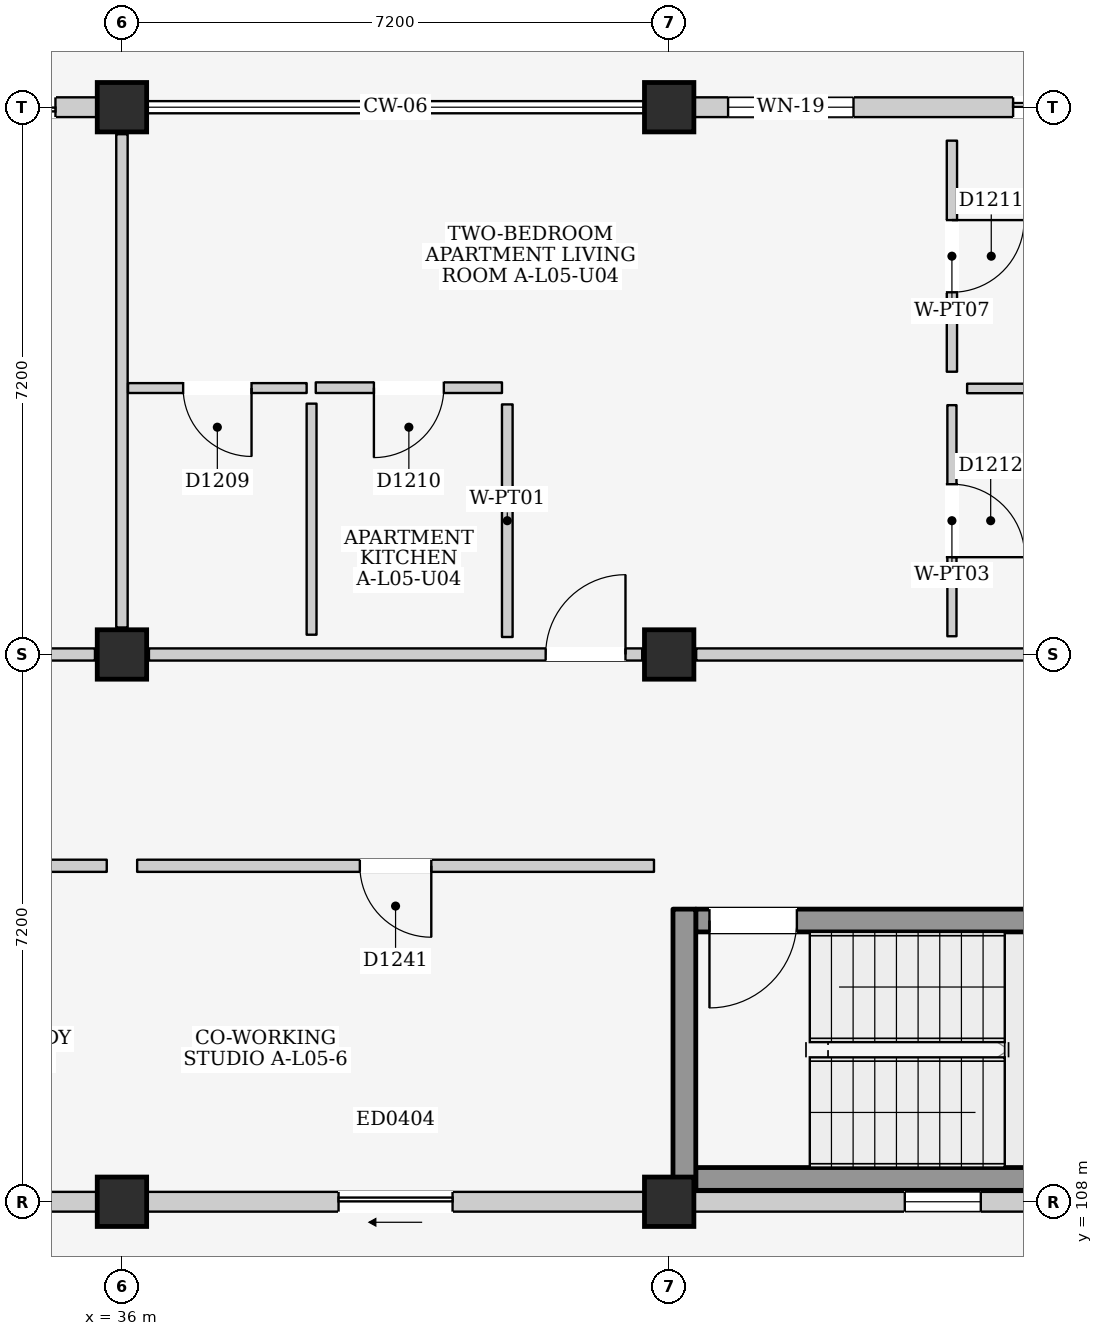
"""IFC4 building model, lengths in metres.
Left out: names, types, materials, properties, quantities, classifications, styles, units other than length and angle.
Written with IfcOpenShell. Run it as: python <this file> out.ifc"""

import sys

from ifc_helpers import new_model, si_unit, direction, frame, frame_2d, origin, origin_2d, place, context, subcontext, project, spatial, rectangle, extrude, element, fill, save


model = new_model("IFC4")
c1 = context("Model", 3, precision=1e-05, world=origin(), true_north=direction((0.0, 1.0)))
c2 = subcontext(c1, "Body", "Model", "MODEL_VIEW")
j1 = project(units=[si_unit("LENGTHUNIT", "METRE"), si_unit("PLANEANGLEUNIT", "RADIAN")], contexts=[c1])
p1 = place(None, origin())
s1 = spatial("IfcSite", under=j1, at=p1, CompositionType="ELEMENT")
p2 = place(p1, origin())
s2 = spatial("IfcBuilding", under=s1, at=p2, CompositionType="ELEMENT")
p3 = place(p2, frame((0.0, 0.0, 18.6)))
s3 = spatial("IfcBuildingStorey", under=s2, at=p3, CompositionType="ELEMENT", Elevation=18.6)
for number, where, z_axis, x_axis in (
    (1, (36.0, 108.0, 0.0), (0.0, 0.0, 1.0), (1.0, 0.0, 0.0)),
    (2, (36.0, 115.2, 0.0), (0.0, 0.0, 1.0), (1.0, 0.0, 0.0)),
    (3, (36.0, 122.4, 0.0), (0.0, 0.0, 1.0), (1.0, 0.0, 0.0)),
    (4, (43.2, 108.0, 0.0), (0.0, 0.0, 1.0), (1.0, 0.0, 0.0)),
    (5, (43.2, 115.2, 0.0), (0.0, 0.0, 1.0), (1.0, 0.0, 0.0)),
    (6, (43.2, 122.4, 0.0), (0.0, 0.0, 1.0), (1.0, 0.0, 0.0)),
):
    element("IfcColumn", number, at=place(p3, frame(where, z_axis=z_axis, x_axis=x_axis)), inside=s3, PredefinedType="COLUMN", context=c2, shape_type="SweptSolid", body=[
        extrude(rectangle(XDim=0.65, YDim=0.65, at=origin_2d()), origin(), (0.0, 0.0, 1.0), 3.3),
    ])
p4 = place(p3, frame((29.125, 122.4, 0.0), z_axis=(0.0, 0.0, 1.0), x_axis=(1.0, 0.0, 0.0)))
e7 = element("IfcWall", 7, at=p4, inside=s3, PredefinedType="ELEMENTEDWALL", context=c2, shape_type="SweptSolid", body=[
    extrude(rectangle(XDim=6.55, YDim=0.26, at=frame_2d((3.275, 0.0))), origin(), (0.0, 0.0, 1.0), 2.595),
])
p5 = place(p4, frame((4.0, 0.0, 0.0)))
e8 = element("IfcOpeningElement", 8, at=p5, cuts=e7, PredefinedType="OPENING", context=c2, shape_type="SweptSolid", body=[
    extrude(rectangle(XDim=2.0, YDim=2.12, at=frame_2d((1.0, 1.06))), frame((0.0, 0.145, 0.0), z_axis=(0.0, -1.0, 0.0), x_axis=(1.0, 0.0, 0.0)), (0.0, 0.0, 1.0), 0.29),
])
p6 = place(p4, frame((0.45, 0.0, 0.9)))
e9 = element("IfcOpeningElement", 9, at=p6, cuts=e7, PredefinedType="OPENING", context=c2, shape_type="SweptSolid", body=[
    extrude(rectangle(XDim=1.25, YDim=1.3, at=frame_2d((0.625, 0.65))), frame((0.0, 0.145, 0.0), z_axis=(0.0, -1.0, 0.0), x_axis=(1.0, 0.0, 0.0)), (0.0, 0.0, 1.0), 0.29),
])
p7 = place(p3, frame((29.125, 108.0, 0.0), z_axis=(0.0, 0.0, 1.0), x_axis=(1.0, 0.0, 0.0)))
e10 = element("IfcWall", 10, at=p7, inside=s3, PredefinedType="ELEMENTEDWALL", context=c2, shape_type="SweptSolid", body=[
    extrude(rectangle(XDim=6.55, YDim=0.26, at=frame_2d((3.275, 0.0))), origin(), (0.0, 0.0, 1.0), 2.395),
])
p8 = place(p7, frame((2.525, 0.0, 0.0)))
e11 = element("IfcOpeningElement", 11, at=p8, cuts=e10, PredefinedType="OPENING", context=c2, shape_type="SweptSolid", body=[
    extrude(rectangle(XDim=1.5, YDim=2.12, at=frame_2d((0.75, 1.06))), frame((0.0, 0.145, 0.0), z_axis=(0.0, -1.0, 0.0), x_axis=(1.0, 0.0, 0.0)), (0.0, 0.0, 1.0), 0.29),
])
p9 = place(p3, frame((36.325, 108.0, 0.0), z_axis=(0.0, 0.0, 1.0), x_axis=(1.0, 0.0, 0.0)))
e12 = element("IfcWall", 12, at=p9, inside=s3, PredefinedType="ELEMENTEDWALL", context=c2, shape_type="SweptSolid", body=[
    extrude(rectangle(XDim=6.55, YDim=0.26, at=frame_2d((3.275, 0.0))), origin(), (0.0, 0.0, 1.0), 2.395),
])
p10 = place(p9, frame((2.525, 0.0, 0.0)))
e13 = element("IfcOpeningElement", 13, at=p10, cuts=e12, PredefinedType="OPENING", context=c2, shape_type="SweptSolid", body=[
    extrude(rectangle(XDim=1.5, YDim=2.12, at=frame_2d((0.75, 1.06))), frame((0.0, 0.145, 0.0), z_axis=(0.0, -1.0, 0.0), x_axis=(1.0, 0.0, 0.0)), (0.0, 0.0, 1.0), 0.29),
])
p11 = place(p3, frame((43.525, 122.4, 0.0), z_axis=(0.0, 0.0, 1.0), x_axis=(1.0, 0.0, 0.0)))
e14 = element("IfcWall", 14, at=p11, inside=s3, PredefinedType="ELEMENTEDWALL", context=c2, shape_type="SweptSolid", body=[
    extrude(rectangle(XDim=6.55, YDim=0.26, at=frame_2d((3.275, 0.0))), origin(), (0.0, 0.0, 1.0), 2.595),
])
p12 = place(p11, frame((4.2, 0.0, 0.0)))
e15 = element("IfcOpeningElement", 15, at=p12, cuts=e14, PredefinedType="OPENING", context=c2, shape_type="SweptSolid", body=[
    extrude(rectangle(XDim=1.8, YDim=2.12, at=frame_2d((0.9, 1.06))), frame((0.0, 0.145, 0.0), z_axis=(0.0, -1.0, 0.0), x_axis=(1.0, 0.0, 0.0)), (0.0, 0.0, 1.0), 0.29),
])
p13 = place(p11, frame((0.45, 0.0, 0.9)))
e16 = element("IfcOpeningElement", 16, at=p13, cuts=e14, PredefinedType="OPENING", context=c2, shape_type="SweptSolid", body=[
    extrude(rectangle(XDim=1.65, YDim=1.35, at=frame_2d((0.825, 0.675))), frame((0.0, 0.145, 0.0), z_axis=(0.0, -1.0, 0.0), x_axis=(1.0, 0.0, 0.0)), (0.0, 0.0, 1.0), 0.29),
])
p14 = place(p3, frame((43.525, 108.0, 0.0), z_axis=(0.0, 0.0, 1.0), x_axis=(1.0, 0.0, 0.0)))
e17 = element("IfcWall", 17, at=p14, inside=s3, PredefinedType="ELEMENTEDWALL", context=c2, shape_type="SweptSolid", body=[
    extrude(rectangle(XDim=6.55, YDim=0.26, at=frame_2d((3.275, 0.0))), origin(), (0.0, 0.0, 1.0), 2.395),
])
p15 = place(p14, frame((2.775, 0.0, 1.2)))
e18 = element("IfcOpeningElement", 18, at=p15, cuts=e17, PredefinedType="OPENING", context=c2, shape_type="SweptSolid", body=[
    extrude(rectangle(XDim=1.0, YDim=0.9, at=frame_2d((0.5, 0.45))), frame((0.0, 0.145, 0.0), z_axis=(0.0, -1.0, 0.0), x_axis=(1.0, 0.0, 0.0)), (0.0, 0.0, 1.0), 0.29),
])
p16 = place(p3, frame((43.55, 108.3, 0.0), z_axis=(0.0, 0.0, 1.0), x_axis=(1.0, 0.0, 0.0)))
e19 = element("IfcWall", 19, at=p16, inside=s3, PredefinedType="SHEAR", context=c2, shape_type="SweptSolid", body=[
    extrude(rectangle(XDim=6.5, YDim=0.3, at=frame_2d((3.25, 0.0))), origin(), (0.0, 0.0, 1.0), 3.06),
])
p17 = place(p3, frame((43.55, 111.7, 0.0), z_axis=(0.0, 0.0, 1.0), x_axis=(1.0, 0.0, 0.0)))
e20 = element("IfcWall", 20, at=p17, inside=s3, PredefinedType="SHEAR", context=c2, shape_type="SweptSolid", body=[
    extrude(rectangle(XDim=6.5, YDim=0.3, at=frame_2d((3.25, 0.0))), origin(), (0.0, 0.0, 1.0), 3.06),
])
p18 = place(p17, frame((0.18, 0.0, 0.0)))
e21 = element("IfcOpeningElement", 21, at=p18, cuts=e20, PredefinedType="OPENING", context=c2, shape_type="SweptSolid", body=[
    extrude(rectangle(XDim=1.15, YDim=2.2, at=frame_2d((0.575, 1.1))), frame((0.0, 0.165, 0.0), z_axis=(0.0, -1.0, 0.0), x_axis=(1.0, 0.0, 0.0)), (0.0, 0.0, 1.0), 0.33),
])
p19 = place(p3, frame((43.4, 108.15, 0.0), z_axis=(0.0, 0.0, 1.0), x_axis=(0.0, 1.0, 0.0)))
e22 = element("IfcWall", 22, at=p19, inside=s3, PredefinedType="SHEAR", context=c2, shape_type="SweptSolid", body=[
    extrude(rectangle(XDim=3.7, YDim=0.3, at=frame_2d((1.85, 0.0))), origin(), (0.0, 0.0, 1.0), 3.06),
])
p20 = place(p3, frame((29.155, 115.2, 0.0), z_axis=(0.0, 0.0, 1.0), x_axis=(1.0, 0.0, 0.0)))
e23 = element("IfcWall", 23, at=p20, inside=s3, PredefinedType="PARTITIONING", context=c2, shape_type="SweptSolid", body=[
    extrude(rectangle(XDim=6.49, YDim=0.16, at=frame_2d((3.245, 0.0))), origin(), (0.0, 0.0, 1.0), 2.395),
])
p21 = place(p20, frame((2.72, 0.0, 0.0)))
e24 = element("IfcOpeningElement", 24, at=p21, cuts=e23, PredefinedType="OPENING", context=c2, shape_type="SweptSolid", body=[
    extrude(rectangle(XDim=1.05, YDim=2.15, at=frame_2d((0.525, 1.075))), frame((0.0, 0.095, 0.0), z_axis=(0.0, -1.0, 0.0), x_axis=(1.0, 0.0, 0.0)), (0.0, 0.0, 1.0), 0.19),
])
p22 = place(p3, frame((36.0, 115.555, 0.0), z_axis=(0.0, 0.0, 1.0), x_axis=(0.0, 1.0, 0.0)))
e25 = element("IfcWall", 25, at=p22, inside=s3, PredefinedType="PARTITIONING", context=c2, shape_type="SweptSolid", body=[
    extrude(rectangle(XDim=6.49, YDim=0.15, at=frame_2d((3.245, 0.0))), origin(), (0.0, 0.0, 1.0), 2.545),
])
p23 = place(p3, frame((36.355, 115.2, 0.0), z_axis=(0.0, 0.0, 1.0), x_axis=(1.0, 0.0, 0.0)))
e26 = element("IfcWall", 26, at=p23, inside=s3, PredefinedType="PARTITIONING", context=c2, shape_type="SweptSolid", body=[
    extrude(rectangle(XDim=6.49, YDim=0.16, at=frame_2d((3.245, 0.0))), origin(), (0.0, 0.0, 1.0), 2.395),
])
p24 = place(p23, frame((5.22, 0.0, 0.0)))
e27 = element("IfcOpeningElement", 27, at=p24, cuts=e26, PredefinedType="OPENING", context=c2, shape_type="SweptSolid", body=[
    extrude(rectangle(XDim=1.05, YDim=2.15, at=frame_2d((0.525, 1.075))), frame((0.0, 0.095, 0.0), z_axis=(0.0, -1.0, 0.0), x_axis=(1.0, 0.0, 0.0)), (0.0, 0.0, 1.0), 0.19),
])
p25 = place(p3, frame((43.555, 115.2, 0.0), z_axis=(0.0, 0.0, 1.0), x_axis=(1.0, 0.0, 0.0)))
e28 = element("IfcWall", 28, at=p25, inside=s3, PredefinedType="PARTITIONING", context=c2, shape_type="SweptSolid", body=[
    extrude(rectangle(XDim=6.49, YDim=0.16, at=frame_2d((3.245, 0.0))), origin(), (0.0, 0.0, 1.0), 2.395),
])
p26 = place(p3, frame((36.08, 118.705, 0.0), z_axis=(0.0, 0.0, 1.0), x_axis=(1.0, 0.0, 0.0)))
e29 = element("IfcWall", 29, at=p26, inside=s3, PredefinedType="PARTITIONING", context=c2, shape_type="SweptSolid", body=[
    extrude(rectangle(XDim=2.35, YDim=0.13, at=frame_2d((1.175, 0.0))), origin(), (0.0, 0.0, 1.0), 3.06),
])
p27 = place(p26, frame((0.725, 0.0, 0.0)))
e30 = element("IfcOpeningElement", 30, at=p27, cuts=e29, PredefinedType="OPENING", context=c2, shape_type="SweptSolid", body=[
    extrude(rectangle(XDim=0.9, YDim=2.1, at=frame_2d((0.45, 1.05))), frame((0.0, 0.08, 0.0), z_axis=(0.0, -1.0, 0.0), x_axis=(1.0, 0.0, 0.0)), (0.0, 0.0, 1.0), 0.16),
])
p28 = place(p3, frame((38.495, 115.46, 0.0), z_axis=(0.0, 0.0, 1.0), x_axis=(0.0, 1.0, 0.0)))
e31 = element("IfcWall", 31, at=p28, inside=s3, PredefinedType="PARTITIONING", context=c2, shape_type="SweptSolid", body=[
    extrude(rectangle(XDim=3.04, YDim=0.13, at=frame_2d((1.52, 0.0))), origin(), (0.0, 0.0, 1.0), 3.06),
])
p29 = place(p3, frame((38.55, 118.71, 0.0), z_axis=(0.0, 0.0, 1.0), x_axis=(1.0, 0.0, 0.0)))
e32 = element("IfcWall", 32, at=p29, inside=s3, PredefinedType="PARTITIONING", context=c2, shape_type="SweptSolid", body=[
    extrude(rectangle(XDim=2.45, YDim=0.14, at=frame_2d((1.225, 0.0))), origin(), (0.0, 0.0, 1.0), 3.06),
])
p30 = place(p29, frame((0.765, 0.0, 0.0)))
e33 = element("IfcOpeningElement", 33, at=p30, cuts=e32, PredefinedType="OPENING", context=c2, shape_type="SweptSolid", body=[
    extrude(rectangle(XDim=0.92, YDim=2.1, at=frame_2d((0.46, 1.05))), frame((0.0, 0.085, 0.0), z_axis=(0.0, -1.0, 0.0), x_axis=(1.0, 0.0, 0.0)), (0.0, 0.0, 1.0), 0.17),
])
p31 = place(p3, frame((41.07, 115.43, 0.0), z_axis=(0.0, 0.0, 1.0), x_axis=(0.0, 1.0, 0.0)))
e34 = element("IfcWall", 34, at=p31, inside=s3, PredefinedType="PARTITIONING", context=c2, shape_type="SweptSolid", body=[
    extrude(rectangle(XDim=3.06, YDim=0.14, at=frame_2d((1.53, 0.0))), origin(), (0.0, 0.0, 1.0), 3.06),
])
p32 = place(p3, frame((46.92, 118.92, 0.0), z_axis=(0.0, 0.0, 1.0), x_axis=(0.0, 1.0, 0.0)))
e35 = element("IfcWall", 35, at=p32, inside=s3, PredefinedType="PARTITIONING", context=c2, shape_type="SweptSolid", body=[
    extrude(rectangle(XDim=3.04, YDim=0.135, at=frame_2d((1.52, 0.0))), origin(), (0.0, 0.0, 1.0), 3.06),
])
p33 = place(p32, frame((1.045, 0.0, 0.0)))
e36 = element("IfcOpeningElement", 36, at=p33, cuts=e35, PredefinedType="OPENING", context=c2, shape_type="SweptSolid", body=[
    extrude(rectangle(XDim=0.95, YDim=2.15, at=frame_2d((0.475, 1.075))), frame((0.0, 0.083, 0.0), z_axis=(0.0, -1.0, 0.0), x_axis=(1.0, 0.0, 0.0)), (0.0, 0.0, 1.0), 0.165),
])
p34 = place(p3, frame((47.12, 118.7, 0.0), z_axis=(0.0, 0.0, 1.0), x_axis=(1.0, 0.0, 0.0)))
e37 = element("IfcWall", 37, at=p34, inside=s3, PredefinedType="PARTITIONING", context=c2, shape_type="SweptSolid", body=[
    extrude(rectangle(XDim=3.06, YDim=0.125, at=frame_2d((1.53, 0.0))), origin(), (0.0, 0.0, 1.0), 3.06),
])
p35 = place(p3, frame((46.92, 115.44, 0.0), z_axis=(0.0, 0.0, 1.0), x_axis=(0.0, 1.0, 0.0)))
e38 = element("IfcWall", 38, at=p35, inside=s3, PredefinedType="PARTITIONING", context=c2, shape_type="SweptSolid", body=[
    extrude(rectangle(XDim=3.04, YDim=0.12, at=frame_2d((1.52, 0.0))), origin(), (0.0, 0.0, 1.0), 3.06),
])
p36 = place(p35, frame((1.04, 0.0, 0.0)))
e39 = element("IfcOpeningElement", 39, at=p36, cuts=e38, PredefinedType="OPENING", context=c2, shape_type="SweptSolid", body=[
    extrude(rectangle(XDim=0.96, YDim=2.15, at=frame_2d((0.48, 1.075))), frame((0.0, 0.075, 0.0), z_axis=(0.0, -1.0, 0.0), x_axis=(1.0, 0.0, 0.0)), (0.0, 0.0, 1.0), 0.15),
])
p37 = place(p3, frame((29.0, 112.42, 0.0), z_axis=(0.0, 0.0, 1.0), x_axis=(1.0, 0.0, 0.0)))
e40 = element("IfcWall", 40, at=p37, inside=s3, PredefinedType="PARTITIONING", context=c2, shape_type="SweptSolid", body=[
    extrude(rectangle(XDim=6.8, YDim=0.16, at=frame_2d((3.4, 0.0))), origin(), (0.0, 0.0, 1.0), 3.06),
])
p38 = place(p37, frame((2.93, 0.0, 0.0)))
e41 = element("IfcOpeningElement", 41, at=p38, cuts=e40, PredefinedType="OPENING", context=c2, shape_type="SweptSolid", body=[
    extrude(rectangle(XDim=0.94, YDim=2.12, at=frame_2d((0.47, 1.06))), frame((0.0, 0.095, 0.0), z_axis=(0.0, -1.0, 0.0), x_axis=(1.0, 0.0, 0.0)), (0.0, 0.0, 1.0), 0.19),
])
p39 = place(p3, frame((36.2, 112.42, 0.0), z_axis=(0.0, 0.0, 1.0), x_axis=(1.0, 0.0, 0.0)))
e42 = element("IfcWall", 42, at=p39, inside=s3, PredefinedType="PARTITIONING", context=c2, shape_type="SweptSolid", body=[
    extrude(rectangle(XDim=6.8, YDim=0.16, at=frame_2d((3.4, 0.0))), origin(), (0.0, 0.0, 1.0), 3.06),
])
p40 = place(p39, frame((2.93, 0.0, 0.0)))
e43 = element("IfcOpeningElement", 43, at=p40, cuts=e42, PredefinedType="OPENING", context=c2, shape_type="SweptSolid", body=[
    extrude(rectangle(XDim=0.94, YDim=2.12, at=frame_2d((0.47, 1.06))), frame((0.0, 0.095, 0.0), z_axis=(0.0, -1.0, 0.0), x_axis=(1.0, 0.0, 0.0)), (0.0, 0.0, 1.0), 0.19),
])
p41 = place(p5, frame((2.0, 0.0, 0.0), z_axis=(0.0, 0.0, 1.0), x_axis=(-1.0, 0.0, 0.0)))
e44 = element("IfcDoor", 44, at=p41, inside=s3, OperationType="DOUBLE_DOOR_SLIDING", PredefinedType="DOOR", context=c2, shape_type="SweptSolid", body=[
    extrude(rectangle(XDim=2.0, YDim=2.12, at=frame_2d((1.0, 1.06))), frame((0.0, 0.025, 0.0), z_axis=(0.0, -1.0, 0.0), x_axis=(1.0, 0.0, 0.0)), (0.0, 0.0, 1.0), 0.05),
])
fill(e8, e44)
p42 = place(p10, frame((1.5, 0.0, 0.0), z_axis=(0.0, 0.0, 1.0), x_axis=(-1.0, 0.0, 0.0)))
e45 = element("IfcDoor", 45, at=p42, inside=s3, OperationType="SLIDING_TO_LEFT", PredefinedType="DOOR", context=c2, shape_type="SweptSolid", body=[
    extrude(rectangle(XDim=1.5, YDim=2.12, at=frame_2d((0.75, 1.06))), frame((0.0, 0.025, 0.0), z_axis=(0.0, -1.0, 0.0), x_axis=(1.0, 0.0, 0.0)), (0.0, 0.0, 1.0), 0.05),
])
fill(e13, e45)
p43 = place(p12, frame((1.8, 0.0, 0.0), z_axis=(0.0, 0.0, 1.0), x_axis=(-1.0, 0.0, 0.0)))
e46 = element("IfcDoor", 46, at=p43, inside=s3, OperationType="SLIDING_TO_LEFT", PredefinedType="DOOR", context=c2, shape_type="SweptSolid", body=[
    extrude(rectangle(XDim=1.8, YDim=2.12, at=frame_2d((0.9, 1.06))), frame((0.0, 0.025, 0.0), z_axis=(0.0, -1.0, 0.0), x_axis=(1.0, 0.0, 0.0)), (0.0, 0.0, 1.0), 0.05),
])
fill(e15, e46)
p44 = place(p13, origin())
e47 = element("IfcWindow", 47, at=p44, inside=s3, PartitioningType="DOUBLE_PANEL_VERTICAL", PredefinedType="WINDOW", context=c2, shape_type="SweptSolid", body=[
    extrude(rectangle(XDim=1.65, YDim=1.35, at=frame_2d((0.825, 0.675))), frame((0.0, 0.03, 0.0), z_axis=(0.0, -1.0, 0.0), x_axis=(1.0, 0.0, 0.0)), (0.0, 0.0, 1.0), 0.06),
])
fill(e16, e47)
p45 = place(p15, origin())
e48 = element("IfcWindow", 48, at=p45, inside=s3, PartitioningType="SINGLE_PANEL", PredefinedType="WINDOW", context=c2, shape_type="SweptSolid", body=[
    extrude(rectangle(XDim=1.0, YDim=0.9, at=frame_2d((0.5, 0.45))), frame((0.0, 0.03, 0.0), z_axis=(0.0, -1.0, 0.0), x_axis=(1.0, 0.0, 0.0)), (0.0, 0.0, 1.0), 0.06),
])
fill(e18, e48)
p46 = place(p18, frame((1.15, 0.0, 0.0), z_axis=(0.0, 0.0, 1.0), x_axis=(-1.0, 0.0, 0.0)))
e49 = element("IfcDoor", 49, at=p46, inside=s3, OperationType="SINGLE_SWING_RIGHT", PredefinedType="DOOR", context=c2, shape_type="SweptSolid", body=[
    extrude(rectangle(XDim=1.15, YDim=2.2, at=frame_2d((0.575, 1.1))), frame((0.0, 0.025, 0.0), z_axis=(0.0, -1.0, 0.0), x_axis=(1.0, 0.0, 0.0)), (0.0, 0.0, 1.0), 0.05),
])
fill(e21, e49)
p47 = place(p24, origin())
e50 = element("IfcDoor", 50, at=p47, inside=s3, OperationType="SINGLE_SWING_RIGHT", PredefinedType="DOOR", context=c2, shape_type="SweptSolid", body=[
    extrude(rectangle(XDim=1.05, YDim=2.15, at=frame_2d((0.525, 1.075))), frame((0.0, 0.025, 0.0), z_axis=(0.0, -1.0, 0.0), x_axis=(1.0, 0.0, 0.0)), (0.0, 0.0, 1.0), 0.05),
])
fill(e27, e50)
p48 = place(p27, frame((0.9, 0.0, 0.0), z_axis=(0.0, 0.0, 1.0), x_axis=(-1.0, 0.0, 0.0)))
e51 = element("IfcDoor", 51, at=p48, inside=s3, OperationType="SINGLE_SWING_LEFT", PredefinedType="DOOR", context=c2, shape_type="SweptSolid", body=[
    extrude(rectangle(XDim=0.9, YDim=2.1, at=frame_2d((0.45, 1.05))), frame((0.0, 0.025, 0.0), z_axis=(0.0, -1.0, 0.0), x_axis=(1.0, 0.0, 0.0)), (0.0, 0.0, 1.0), 0.05),
])
fill(e30, e51)
p49 = place(p30, frame((0.92, 0.0, 0.0), z_axis=(0.0, 0.0, 1.0), x_axis=(-1.0, 0.0, 0.0)))
e52 = element("IfcDoor", 52, at=p49, inside=s3, OperationType="SINGLE_SWING_RIGHT", PredefinedType="DOOR", context=c2, shape_type="SweptSolid", body=[
    extrude(rectangle(XDim=0.92, YDim=2.1, at=frame_2d((0.46, 1.05))), frame((0.0, 0.025, 0.0), z_axis=(0.0, -1.0, 0.0), x_axis=(1.0, 0.0, 0.0)), (0.0, 0.0, 1.0), 0.05),
])
fill(e33, e52)
p50 = place(p33, frame((0.95, 0.0, 0.0), z_axis=(0.0, 0.0, 1.0), x_axis=(-1.0, 0.0, 0.0)))
e53 = element("IfcDoor", 53, at=p50, inside=s3, OperationType="SINGLE_SWING_LEFT", PredefinedType="DOOR", context=c2, shape_type="SweptSolid", body=[
    extrude(rectangle(XDim=0.95, YDim=2.15, at=frame_2d((0.475, 1.075))), frame((0.0, 0.025, 0.0), z_axis=(0.0, -1.0, 0.0), x_axis=(1.0, 0.0, 0.0)), (0.0, 0.0, 1.0), 0.05),
])
fill(e36, e53)
p51 = place(p36, frame((0.96, 0.0, 0.0), z_axis=(0.0, 0.0, 1.0), x_axis=(-1.0, 0.0, 0.0)))
e54 = element("IfcDoor", 54, at=p51, inside=s3, OperationType="SINGLE_SWING_RIGHT", PredefinedType="DOOR", context=c2, shape_type="SweptSolid", body=[
    extrude(rectangle(XDim=0.96, YDim=2.15, at=frame_2d((0.48, 1.075))), frame((0.0, 0.025, 0.0), z_axis=(0.0, -1.0, 0.0), x_axis=(1.0, 0.0, 0.0)), (0.0, 0.0, 1.0), 0.05),
])
fill(e39, e54)
p52 = place(p40, frame((0.94, 0.0, 0.0), z_axis=(0.0, 0.0, 1.0), x_axis=(-1.0, 0.0, 0.0)))
e55 = element("IfcDoor", 55, at=p52, inside=s3, OperationType="SINGLE_SWING_LEFT", PredefinedType="DOOR", context=c2, shape_type="SweptSolid", body=[
    extrude(rectangle(XDim=0.94, YDim=2.12, at=frame_2d((0.47, 1.06))), frame((0.0, 0.025, 0.0), z_axis=(0.0, -1.0, 0.0), x_axis=(1.0, 0.0, 0.0)), (0.0, 0.0, 1.0), 0.05),
])
fill(e43, e55)
save(model, sys.argv[1])
